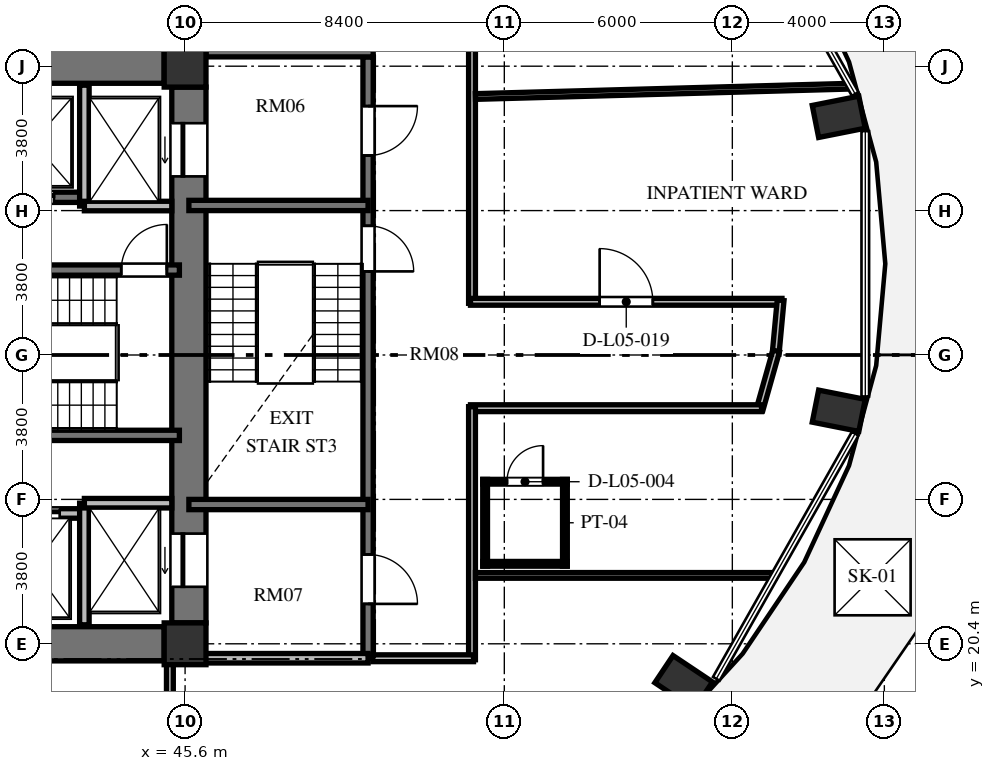
"""IFC4 building model, lengths in metres.
Left out: names, types, materials, properties, quantities, classifications, styles, units other than length and angle.
Written with IfcOpenShell. Run it as: python <this file> out.ifc"""

import sys

from ifc_helpers import new_model, si_unit, direction, frame, frame_2d, origin, origin_2d, place, context, subcontext, project, spatial, rectangle, extrude, element, fill, save


model = new_model("IFC4")
c1 = context("Model", 3, precision=1e-05, world=origin(), true_north=direction((0.0, 1.0)))
c2 = subcontext(c1, "Body", "Model", "MODEL_VIEW")
j1 = project(units=[si_unit("LENGTHUNIT", "METRE"), si_unit("PLANEANGLEUNIT", "RADIAN")], contexts=[c1])
p1 = place(None, origin())
s1 = spatial("IfcSite", under=j1, at=p1, CompositionType="ELEMENT")
p2 = place(p1, origin())
s2 = spatial("IfcBuilding", under=s1, at=p2, CompositionType="ELEMENT")
p3 = place(p2, frame((0.0, 0.0, 25.2)))
s3 = spatial("IfcBuildingStorey", under=s2, at=p3, CompositionType="ELEMENT", Elevation=25.2)
for number, where, z_axis, x_axis in (
    (1, (58.72, 19.386, 0.0), (0.0, 0.0, 1.0), (0.831, -0.556, 0.0)),
    (2, (62.8, 26.532, 0.0), (0.0, 0.0, 1.0), (0.981, -0.195, 0.0)),
    (3, (62.8, 34.268, 0.0), (0.0, 0.0, 1.0), (0.981, 0.195, 0.0)),
):
    element("IfcColumn", number, at=place(p3, frame(where, z_axis=z_axis, x_axis=x_axis)), inside=s3, PredefinedType="COLUMN", context=c2, shape_type="SweptSolid", body=[
        extrude(rectangle(XDim=1.25, YDim=0.86, at=origin_2d()), origin(), (0.0, 0.0, 1.0), 3.648),
    ])
for number, where, z_axis, x_axis in (
    (4, (45.6, 20.4, 0.0), (0.0, 0.0, 1.0), (1.0, 0.0, 0.0)),
    (5, (45.6, 35.6, 0.0), (0.0, 0.0, 1.0), (1.0, 0.0, 0.0)),
):
    element("IfcColumn", number, at=place(p3, frame(where, z_axis=z_axis, x_axis=x_axis)), inside=s3, PredefinedType="COLUMN", context=c2, shape_type="SweptSolid", body=[
        extrude(rectangle(XDim=1.1, YDim=1.1, at=origin_2d()), origin(), (0.0, 0.0, 1.0), 3.648),
    ])
p4 = place(p3, frame((45.7, 20.95, 0.0), z_axis=(0.0, 0.0, 1.0), x_axis=(0.0, 1.0, 0.0)))
e6 = element("IfcWall", 6, at=p4, inside=s3, PredefinedType="SHEAR", context=c2, shape_type="SweptSolid", body=[
    extrude(rectangle(XDim=14.1, YDim=0.9, at=frame_2d((7.05, 0.0))), origin(), (0.0, 0.0, 1.0), 3.648),
])
p5 = place(p4, frame((11.75, 0.0, 0.0)))
e7 = element("IfcOpeningElement", 7, at=p5, cuts=e6, PredefinedType="OPENING", context=c2, shape_type="SweptSolid", body=[
    extrude(rectangle(XDim=1.4, YDim=2.3, at=frame_2d((0.7, 1.15))), frame((0.0, 0.46, 0.0), z_axis=(0.0, -1.0, 0.0), x_axis=(1.0, 0.0, 0.0)), (0.0, 0.0, 1.0), 0.92),
])
p6 = place(p4, frame((0.95, 0.0, 0.0)))
e8 = element("IfcOpeningElement", 8, at=p6, cuts=e6, PredefinedType="OPENING", context=c2, shape_type="SweptSolid", body=[
    extrude(rectangle(XDim=1.4, YDim=2.3, at=frame_2d((0.7, 1.15))), frame((0.0, 0.46, 0.0), z_axis=(0.0, -1.0, 0.0), x_axis=(1.0, 0.0, 0.0)), (0.0, 0.0, 1.0), 0.92),
])
for number, where, z_axis, x_axis in (
    (9, (39.75, 20.4, 0.0), (0.0, 0.0, 1.0), (1.0, 0.0, 0.0)),
    (10, (39.75, 35.6, 0.0), (0.0, 0.0, 1.0), (1.0, 0.0, 0.0)),
):
    element("IfcWall", number, at=place(p3, frame(where, z_axis=z_axis, x_axis=x_axis)), inside=s3, PredefinedType="SHEAR", context=c2, shape_type="SweptSolid", body=[
        extrude(rectangle(XDim=5.3, YDim=0.9, at=frame_2d((2.65, 0.0))), origin(), (0.0, 0.0, 1.0), 3.648),
    ])
p7 = place(p3, frame((37.465, 30.235, 0.0), z_axis=(0.0, 0.0, 1.0), x_axis=(1.0, 0.0, 0.0)))
e11 = element("IfcWall", 11, at=p7, inside=s3, PredefinedType="SHEAR", context=c2, shape_type="SweptSolid", body=[
    extrude(rectangle(XDim=7.985, YDim=0.27, at=frame_2d((3.992, 0.0))), origin(), (0.0, 0.0, 1.0), 3.648),
])
p8 = place(p7, frame((6.455, 0.0, 0.0)))
e12 = element("IfcOpeningElement", 12, at=p8, cuts=e11, PredefinedType="OPENING", context=c2, shape_type="SweptSolid", body=[
    extrude(rectangle(XDim=1.2, YDim=2.15, at=frame_2d((0.6, 1.075))), frame((0.0, 0.145, 0.0), z_axis=(0.0, -1.0, 0.0), x_axis=(1.0, 0.0, 0.0)), (0.0, 0.0, 1.0), 0.29),
])
p9 = place(p3, frame((37.465, 25.885, 0.0), z_axis=(0.0, 0.0, 1.0), x_axis=(1.0, 0.0, 0.0)))
e13 = element("IfcWall", 13, at=p9, inside=s3, PredefinedType="SHEAR", context=c2, shape_type="SweptSolid", body=[
    extrude(rectangle(XDim=7.985, YDim=0.27, at=frame_2d((3.992, 0.0))), origin(), (0.0, 0.0, 1.0), 3.648),
])
p10 = place(p3, frame((26.55, 32.15, 0.0), z_axis=(0.0, 0.0, 1.0), x_axis=(1.0, 0.0, 0.0)))
e14 = element("IfcWall", 14, at=p10, inside=s3, PredefinedType="SHEAR", context=c2, shape_type="SweptSolid", body=[
    extrude(rectangle(XDim=16.4, YDim=0.27, at=frame_2d((8.2, 0.0))), origin(), (0.0, 0.0, 1.0), 3.648),
])
p11 = place(p10, frame((1.1, 0.0, 0.0)))
e15 = element("IfcOpeningElement", 15, at=p11, cuts=e14, PredefinedType="OPENING", context=c2, shape_type="SweptSolid", body=[
    extrude(rectangle(XDim=1.1, YDim=2.2, at=frame_2d((0.55, 1.1))), frame((0.0, 0.145, 0.0), z_axis=(0.0, -1.0, 0.0), x_axis=(1.0, 0.0, 0.0)), (0.0, 0.0, 1.0), 0.29),
])
p12 = place(p10, frame((3.7, 0.0, 0.0)))
e16 = element("IfcOpeningElement", 16, at=p12, cuts=e14, PredefinedType="OPENING", context=c2, shape_type="SweptSolid", body=[
    extrude(rectangle(XDim=1.1, YDim=2.2, at=frame_2d((0.55, 1.1))), frame((0.0, 0.145, 0.0), z_axis=(0.0, -1.0, 0.0), x_axis=(1.0, 0.0, 0.0)), (0.0, 0.0, 1.0), 0.29),
])
p13 = place(p10, frame((6.5, 0.0, 0.0)))
e17 = element("IfcOpeningElement", 17, at=p13, cuts=e14, PredefinedType="OPENING", context=c2, shape_type="SweptSolid", body=[
    extrude(rectangle(XDim=1.1, YDim=2.2, at=frame_2d((0.55, 1.1))), frame((0.0, 0.145, 0.0), z_axis=(0.0, -1.0, 0.0), x_axis=(1.0, 0.0, 0.0)), (0.0, 0.0, 1.0), 0.29),
])
p14 = place(p10, frame((9.1, 0.0, 0.0)))
e18 = element("IfcOpeningElement", 18, at=p14, cuts=e14, PredefinedType="OPENING", context=c2, shape_type="SweptSolid", body=[
    extrude(rectangle(XDim=1.1, YDim=2.2, at=frame_2d((0.55, 1.1))), frame((0.0, 0.145, 0.0), z_axis=(0.0, -1.0, 0.0), x_axis=(1.0, 0.0, 0.0)), (0.0, 0.0, 1.0), 0.29),
])
p15 = place(p10, frame((11.9, 0.0, 0.0)))
e19 = element("IfcOpeningElement", 19, at=p15, cuts=e14, PredefinedType="OPENING", context=c2, shape_type="SweptSolid", body=[
    extrude(rectangle(XDim=1.1, YDim=2.2, at=frame_2d((0.55, 1.1))), frame((0.0, 0.145, 0.0), z_axis=(0.0, -1.0, 0.0), x_axis=(1.0, 0.0, 0.0)), (0.0, 0.0, 1.0), 0.29),
])
p16 = place(p10, frame((14.5, 0.0, 0.0)))
e20 = element("IfcOpeningElement", 20, at=p16, cuts=e14, PredefinedType="OPENING", context=c2, shape_type="SweptSolid", body=[
    extrude(rectangle(XDim=1.1, YDim=2.2, at=frame_2d((0.55, 1.1))), frame((0.0, 0.145, 0.0), z_axis=(0.0, -1.0, 0.0), x_axis=(1.0, 0.0, 0.0)), (0.0, 0.0, 1.0), 0.29),
])
p17 = place(p3, frame((26.75, 23.83, 0.0), z_axis=(0.0, 0.0, 1.0), x_axis=(1.0, 0.0, 0.0)))
e21 = element("IfcWall", 21, at=p17, inside=s3, PredefinedType="SOLIDWALL", context=c2, shape_type="SweptSolid", body=[
    extrude(rectangle(XDim=16.2, YDim=0.25, at=frame_2d((8.1, 0.0))), origin(), (0.0, 0.0, 1.0), 3.428),
])
p18 = place(p17, frame((0.9, 0.0, 0.0)))
e22 = element("IfcOpeningElement", 22, at=p18, cuts=e21, PredefinedType="OPENING", context=c2, shape_type="SweptSolid", body=[
    extrude(rectangle(XDim=1.1, YDim=2.2, at=frame_2d((0.55, 1.1))), frame((0.0, 0.135, 0.0), z_axis=(0.0, -1.0, 0.0), x_axis=(1.0, 0.0, 0.0)), (0.0, 0.0, 1.0), 0.27),
])
p19 = place(p17, frame((3.5, 0.0, 0.0)))
e23 = element("IfcOpeningElement", 23, at=p19, cuts=e21, PredefinedType="OPENING", context=c2, shape_type="SweptSolid", body=[
    extrude(rectangle(XDim=1.1, YDim=2.2, at=frame_2d((0.55, 1.1))), frame((0.0, 0.135, 0.0), z_axis=(0.0, -1.0, 0.0), x_axis=(1.0, 0.0, 0.0)), (0.0, 0.0, 1.0), 0.27),
])
p20 = place(p17, frame((6.3, 0.0, 0.0)))
e24 = element("IfcOpeningElement", 24, at=p20, cuts=e21, PredefinedType="OPENING", context=c2, shape_type="SweptSolid", body=[
    extrude(rectangle(XDim=1.1, YDim=2.2, at=frame_2d((0.55, 1.1))), frame((0.0, 0.135, 0.0), z_axis=(0.0, -1.0, 0.0), x_axis=(1.0, 0.0, 0.0)), (0.0, 0.0, 1.0), 0.27),
])
p21 = place(p17, frame((8.9, 0.0, 0.0)))
e25 = element("IfcOpeningElement", 25, at=p21, cuts=e21, PredefinedType="OPENING", context=c2, shape_type="SweptSolid", body=[
    extrude(rectangle(XDim=1.1, YDim=2.2, at=frame_2d((0.55, 1.1))), frame((0.0, 0.135, 0.0), z_axis=(0.0, -1.0, 0.0), x_axis=(1.0, 0.0, 0.0)), (0.0, 0.0, 1.0), 0.27),
])
p22 = place(p17, frame((11.7, 0.0, 0.0)))
e26 = element("IfcOpeningElement", 26, at=p22, cuts=e21, PredefinedType="OPENING", context=c2, shape_type="SweptSolid", body=[
    extrude(rectangle(XDim=1.1, YDim=2.2, at=frame_2d((0.55, 1.1))), frame((0.0, 0.135, 0.0), z_axis=(0.0, -1.0, 0.0), x_axis=(1.0, 0.0, 0.0)), (0.0, 0.0, 1.0), 0.27),
])
p23 = place(p17, frame((14.15, 0.0, 0.0)))
e27 = element("IfcOpeningElement", 27, at=p23, cuts=e21, PredefinedType="OPENING", context=c2, shape_type="SweptSolid", body=[
    extrude(rectangle(XDim=1.4, YDim=2.3, at=frame_2d((0.7, 1.15))), frame((0.0, 0.135, 0.0), z_axis=(0.0, -1.0, 0.0), x_axis=(1.0, 0.0, 0.0)), (0.0, 0.0, 1.0), 0.27),
])
p24 = place(p3, frame((42.95, 31.92, 0.0), z_axis=(0.0, 0.0, 1.0), x_axis=(0.0, 1.0, 0.0)))
e28 = element("IfcWall", 28, at=p24, inside=s3, PredefinedType="SOLIDWALL", context=c2, shape_type="SweptSolid", body=[
    extrude(rectangle(XDim=3.18, YDim=0.25, at=frame_2d((1.59, 0.0))), origin(), (0.0, 0.0, 1.0), 3.428),
])
p25 = place(p3, frame((42.95, 31.92, 0.0), z_axis=(0.0, 0.0, 1.0), x_axis=(1.0, 0.0, 0.0)))
e29 = element("IfcWall", 29, at=p25, inside=s3, PredefinedType="SOLIDWALL", context=c2, shape_type="SweptSolid", body=[
    extrude(rectangle(XDim=2.3, YDim=0.25, at=frame_2d((1.15, 0.0))), origin(), (0.0, 0.0, 1.0), 3.428),
])
p26 = place(p3, frame((42.95, 20.9, 0.0), z_axis=(0.0, 0.0, 1.0), x_axis=(0.0, 1.0, 0.0)))
e30 = element("IfcWall", 30, at=p26, inside=s3, PredefinedType="SOLIDWALL", context=c2, shape_type="SweptSolid", body=[
    extrude(rectangle(XDim=3.2, YDim=0.25, at=frame_2d((1.6, 0.0))), origin(), (0.0, 0.0, 1.0), 3.428),
])
p27 = place(p3, frame((42.95, 24.1, 0.0), z_axis=(0.0, 0.0, 1.0), x_axis=(1.0, 0.0, 0.0)))
e31 = element("IfcWall", 31, at=p27, inside=s3, PredefinedType="SOLIDWALL", context=c2, shape_type="SweptSolid", body=[
    extrude(rectangle(XDim=2.3, YDim=0.25, at=frame_2d((1.15, 0.0))), origin(), (0.0, 0.0, 1.0), 3.428),
])
p28 = place(p3, frame((50.415, 35.845, 0.0), z_axis=(0.0, 0.0, 1.0), x_axis=(0.0, -1.0, 0.0)))
e32 = element("IfcWall", 32, at=p28, inside=s3, PredefinedType="SHEAR", context=c2, shape_type="SweptSolid", body=[
    extrude(rectangle(XDim=15.825, YDim=0.27, at=frame_2d((7.913, 0.0))), origin(), (0.0, 0.0, 1.0), 3.648),
])
p29 = place(p28, frame((4.445, 0.0, 0.0)))
e33 = element("IfcOpeningElement", 33, at=p29, cuts=e32, PredefinedType="OPENING", context=c2, shape_type="SweptSolid", body=[
    extrude(rectangle(XDim=1.2, YDim=2.15, at=frame_2d((0.6, 1.075))), frame((0.0, 0.145, 0.0), z_axis=(0.0, -1.0, 0.0), x_axis=(1.0, 0.0, 0.0)), (0.0, 0.0, 1.0), 0.29),
])
p30 = place(p28, frame((1.295, 0.0, 0.0)))
e34 = element("IfcOpeningElement", 34, at=p30, cuts=e32, PredefinedType="OPENING", context=c2, shape_type="SweptSolid", body=[
    extrude(rectangle(XDim=1.3, YDim=2.2, at=frame_2d((0.65, 1.1))), frame((0.0, 0.145, 0.0), z_axis=(0.0, -1.0, 0.0), x_axis=(1.0, 0.0, 0.0)), (0.0, 0.0, 1.0), 0.29),
])
p31 = place(p28, frame((13.095, 0.0, 0.0)))
e35 = element("IfcOpeningElement", 35, at=p31, cuts=e32, PredefinedType="OPENING", context=c2, shape_type="SweptSolid", body=[
    extrude(rectangle(XDim=1.3, YDim=2.2, at=frame_2d((0.65, 1.1))), frame((0.0, 0.145, 0.0), z_axis=(0.0, -1.0, 0.0), x_axis=(1.0, 0.0, 0.0)), (0.0, 0.0, 1.0), 0.29),
])
p32 = place(p3, frame((46.15, 35.98, 0.0), z_axis=(0.0, 0.0, 1.0), x_axis=(1.0, 0.0, 0.0)))
e36 = element("IfcWall", 36, at=p32, inside=s3, PredefinedType="SHEAR", context=c2, shape_type="SweptSolid", body=[
    extrude(rectangle(XDim=4.4, YDim=0.27, at=frame_2d((2.2, 0.0))), origin(), (0.0, 0.0, 1.0), 3.648),
])
for number, where, z_axis, x_axis in (
    (37, (45.7, 31.935, 0.0), (0.0, 0.0, 1.0), (1.0, 0.0, 0.0)),
    (38, (45.7, 24.065, 0.0), (0.0, 0.0, 1.0), (1.0, 0.0, 0.0)),
):
    element("IfcWall", number, at=place(p3, frame(where, z_axis=z_axis, x_axis=x_axis)), inside=s3, PredefinedType="SHEAR", context=c2, shape_type="SweptSolid", body=[
        extrude(rectangle(XDim=4.715, YDim=0.27, at=frame_2d((2.357, 0.0))), origin(), (0.0, 0.0, 1.0), 3.648),
    ])
p33 = place(p3, frame((45.7, 20.02, 0.0), z_axis=(0.0, 0.0, 1.0), x_axis=(1.0, 0.0, 0.0)))
e39 = element("IfcWall", 39, at=p33, inside=s3, PredefinedType="SOLIDWALL", context=c2, shape_type="SweptSolid", body=[
    extrude(rectangle(XDim=4.715, YDim=0.25, at=frame_2d((2.357, 0.0))), origin(), (0.0, 0.0, 1.0), 2.813),
])
p34 = place(p3, frame((53.15, 38.79, 0.0), z_axis=(0.0, 0.0, 1.0), x_axis=(0.0, -1.0, 0.0)))
e40 = element("IfcWall", 40, at=p34, inside=s3, PredefinedType="PARTITIONING", context=c2, shape_type="SweptSolid", body=[
    extrude(rectangle(XDim=9.43, YDim=0.18, at=frame_2d((4.715, 0.0))), origin(), (0.0, 0.0, 1.0), 3.428),
])
p35 = place(p3, frame((53.11, 29.4, 0.0), z_axis=(0.0, 0.0, 1.0), x_axis=(1.0, 0.0, 0.0)))
e41 = element("IfcWall", 41, at=p35, inside=s3, PredefinedType="PARTITIONING", context=c2, shape_type="SweptSolid", body=[
    extrude(rectangle(XDim=8.197, YDim=0.18, at=frame_2d((4.098, 0.0))), origin(), (0.0, 0.0, 1.0), 3.428),
])
p36 = place(p35, frame((3.398, 0.0, 0.0)))
e42 = element("IfcOpeningElement", 42, at=p36, cuts=e41, PredefinedType="OPENING", context=c2, shape_type="SweptSolid", body=[
    extrude(rectangle(XDim=1.4, YDim=2.2, at=frame_2d((0.7, 1.1))), frame((0.0, 0.1, 0.0), z_axis=(0.0, -1.0, 0.0), x_axis=(1.0, 0.0, 0.0)), (0.0, 0.0, 1.0), 0.2),
])
p37 = place(p3, frame((61.271, 29.44, 0.0), z_axis=(0.0, 0.0, 1.0), x_axis=(-0.092539930621, -0.995708974169, 0.0)))
e43 = element("IfcWall", 43, at=p37, inside=s3, PredefinedType="PARTITIONING", context=c2, shape_type="SweptSolid", body=[
    extrude(rectangle(XDim=1.417, YDim=0.18, at=frame_2d((0.708, 0.0))), origin(), (0.0, 0.0, 1.0), 3.428),
])
p38 = place(p3, frame((61.154, 28.107, 0.0), z_axis=(0.0, 0.0, 1.0), x_axis=(-0.271748942561, -0.962368179138, 0.0)))
e44 = element("IfcWall", 44, at=p38, inside=s3, PredefinedType="PARTITIONING", context=c2, shape_type="SweptSolid", body=[
    extrude(rectangle(XDim=1.606, YDim=0.18, at=frame_2d((0.803, 0.0))), origin(), (0.0, 0.0, 1.0), 3.428),
])
p39 = place(p3, frame((60.768, 26.6, 0.0), z_axis=(0.0, 0.0, 1.0), x_axis=(-1.0, 0.0, 0.0)))
e45 = element("IfcWall", 45, at=p39, inside=s3, PredefinedType="PARTITIONING", context=c2, shape_type="SweptSolid", body=[
    extrude(rectangle(XDim=7.658, YDim=0.18, at=frame_2d((3.829, 0.0))), origin(), (0.0, 0.0, 1.0), 3.428),
])
p40 = place(p3, frame((53.15, 26.64, 0.0), z_axis=(0.0, 0.0, 1.0), x_axis=(0.0, -1.0, 0.0)))
e46 = element("IfcWall", 46, at=p40, inside=s3, PredefinedType="PARTITIONING", context=c2, shape_type="SweptSolid", body=[
    extrude(rectangle(XDim=6.66, YDim=0.18, at=frame_2d((3.33, 0.0))), origin(), (0.0, 0.0, 1.0), 3.428),
])
p41 = place(p3, frame((53.19, 20.02, 0.0), z_axis=(0.0, 0.0, 1.0), x_axis=(-1.0, 0.0, 0.0)))
e47 = element("IfcWall", 47, at=p41, inside=s3, PredefinedType="PARTITIONING", context=c2, shape_type="SweptSolid", body=[
    extrude(rectangle(XDim=2.65, YDim=0.18, at=frame_2d((1.325, 0.0))), origin(), (0.0, 0.0, 1.0), 2.813),
])
p42 = place(p3, frame((45.2, 19.91, 0.0), z_axis=(0.0, 0.0, 1.0), x_axis=(0.0, -1.0, 0.0)))
e48 = element("IfcWall", 48, at=p42, inside=s3, PredefinedType="PARTITIONING", context=c2, shape_type="SweptSolid", body=[
    extrude(rectangle(XDim=2.55, YDim=0.18, at=frame_2d((1.275, 0.0))), origin(), (0.0, 0.0, 1.0), 3.428),
])
p43 = place(p3, frame((53.24, 22.2, 0.0), z_axis=(0.0, 0.0, 1.0), x_axis=(1.0, 0.0, 0.0)))
e49 = element("IfcWall", 49, at=p43, inside=s3, PredefinedType="PARTITIONING", context=c2, shape_type="SweptSolid", body=[
    extrude(rectangle(XDim=7.875, YDim=0.15, at=frame_2d((3.938, 0.0))), origin(), (0.0, 0.0, 1.0), 3.428),
])
p44 = place(p3, frame((53.24, 34.802, 0.0), z_axis=(0.0, 0.0, 1.0), x_axis=(0.999620561748, 0.027545099924, 0.0)))
e50 = element("IfcWall", 50, at=p44, inside=s3, PredefinedType="PARTITIONING", context=c2, shape_type="SweptSolid", body=[
    extrude(rectangle(XDim=9.891, YDim=0.15, at=frame_2d((4.946, 0.0))), origin(), (0.0, 0.0, 1.0), 2.813),
])
p45 = place(p3, frame((53.435, 24.665, 0.0), z_axis=(0.0, 0.0, 1.0), x_axis=(1.0, 0.0, 0.0)))
e51 = element("IfcWall", 51, at=p45, inside=s3, PredefinedType="PARTITIONING", context=c2, shape_type="SweptSolid", body=[
    extrude(rectangle(XDim=2.22, YDim=0.125, at=frame_2d((1.11, 0.0))), origin(), (0.0, 0.0, 1.0), 3.428),
])
p46 = place(p45, frame((0.635, 0.0, 0.0)))
e52 = element("IfcOpeningElement", 52, at=p46, cuts=e51, PredefinedType="OPENING", context=c2, shape_type="SweptSolid", body=[
    extrude(rectangle(XDim=0.95, YDim=2.1, at=frame_2d((0.475, 1.05))), frame((0.0, 0.073, 0.0), z_axis=(0.0, -1.0, 0.0), x_axis=(1.0, 0.0, 0.0)), (0.0, 0.0, 1.0), 0.145),
])
p47 = place(p3, frame((53.435, 22.505, 0.0), z_axis=(0.0, 0.0, 1.0), x_axis=(1.0, 0.0, 0.0)))
e53 = element("IfcWall", 53, at=p47, inside=s3, PredefinedType="PARTITIONING", context=c2, shape_type="SweptSolid", body=[
    extrude(rectangle(XDim=2.22, YDim=0.125, at=frame_2d((1.11, 0.0))), origin(), (0.0, 0.0, 1.0), 3.428),
])
for number, where, z_axis, x_axis in (
    (54, (55.595, 22.445, 0.0), (0.0, 0.0, 1.0), (0.0, 1.0, 0.0)),
    (55, (53.495, 22.445, 0.0), (0.0, 0.0, 1.0), (0.0, 1.0, 0.0)),
):
    element("IfcWall", number, at=place(p3, frame(where, z_axis=z_axis, x_axis=x_axis)), inside=s3, PredefinedType="PARTITIONING", context=c2, shape_type="SweptSolid", body=[
        extrude(rectangle(XDim=2.28, YDim=0.125, at=frame_2d((1.14, 0.0))), origin(), (0.0, 0.0, 1.0), 3.428),
    ])
p48 = place(p3, frame((0.0, 0.0, -0.22)))
p49 = place(p48, frame((63.691, 22.15, 0.0)))
p50 = place(p49, frame((0.0, 0.0, 0.22)))
e56 = element("IfcWindow", 56, at=p50, inside=s3, PartitioningType="SINGLE_PANEL", PredefinedType="SKYLIGHT", context=c2, shape_type="SweptSolid", body=[
    extrude(rectangle(XDim=2.0, YDim=2.0, at=origin_2d()), origin(), (0.0, 0.0, 1.0), 0.05),
])
p51 = place(p8, origin())
e57 = element("IfcDoor", 57, at=p51, inside=s3, OperationType="SINGLE_SWING_RIGHT", PredefinedType="DOOR", context=c2, shape_type="SweptSolid", body=[
    extrude(rectangle(XDim=1.2, YDim=2.15, at=frame_2d((0.6, 1.075))), frame((0.0, 0.025, 0.0), z_axis=(0.0, -1.0, 0.0), x_axis=(1.0, 0.0, 0.0)), (0.0, 0.0, 1.0), 0.05),
])
fill(e12, e57)
p52 = place(p16, origin())
e58 = element("IfcDoor", 58, at=p52, inside=s3, OperationType="SLIDING_TO_LEFT", PredefinedType="DOOR", context=c2, shape_type="SweptSolid", body=[
    extrude(rectangle(XDim=1.1, YDim=2.2, at=frame_2d((0.55, 1.1))), frame((0.0, 0.025, 0.0), z_axis=(0.0, -1.0, 0.0), x_axis=(1.0, 0.0, 0.0)), (0.0, 0.0, 1.0), 0.05),
])
fill(e20, e58)
p53 = place(p5, origin())
e59 = element("IfcDoor", 59, at=p53, inside=s3, OperationType="SLIDING_TO_LEFT", PredefinedType="DOOR", context=c2, shape_type="SweptSolid", body=[
    extrude(rectangle(XDim=1.4, YDim=2.3, at=frame_2d((0.7, 1.15))), frame((0.0, 0.025, 0.0), z_axis=(0.0, -1.0, 0.0), x_axis=(1.0, 0.0, 0.0)), (0.0, 0.0, 1.0), 0.05),
])
fill(e7, e59)
p54 = place(p6, origin())
e60 = element("IfcDoor", 60, at=p54, inside=s3, OperationType="SLIDING_TO_LEFT", PredefinedType="DOOR", context=c2, shape_type="SweptSolid", body=[
    extrude(rectangle(XDim=1.4, YDim=2.3, at=frame_2d((0.7, 1.15))), frame((0.0, 0.025, 0.0), z_axis=(0.0, -1.0, 0.0), x_axis=(1.0, 0.0, 0.0)), (0.0, 0.0, 1.0), 0.05),
])
fill(e8, e60)
p55 = place(p23, origin())
e61 = element("IfcDoor", 61, at=p55, inside=s3, OperationType="SLIDING_TO_LEFT", PredefinedType="DOOR", context=c2, shape_type="SweptSolid", body=[
    extrude(rectangle(XDim=1.4, YDim=2.3, at=frame_2d((0.7, 1.15))), frame((0.0, 0.025, 0.0), z_axis=(0.0, -1.0, 0.0), x_axis=(1.0, 0.0, 0.0)), (0.0, 0.0, 1.0), 0.05),
])
fill(e27, e61)
p56 = place(p29, origin())
e62 = element("IfcDoor", 62, at=p56, inside=s3, OperationType="SINGLE_SWING_RIGHT", PredefinedType="DOOR", context=c2, shape_type="SweptSolid", body=[
    extrude(rectangle(XDim=1.2, YDim=2.15, at=frame_2d((0.6, 1.075))), frame((0.0, 0.025, 0.0), z_axis=(0.0, -1.0, 0.0), x_axis=(1.0, 0.0, 0.0)), (0.0, 0.0, 1.0), 0.05),
])
fill(e33, e62)
p57 = place(p30, origin())
e63 = element("IfcDoor", 63, at=p57, inside=s3, OperationType="SINGLE_SWING_LEFT", PredefinedType="DOOR", context=c2, shape_type="SweptSolid", body=[
    extrude(rectangle(XDim=1.3, YDim=2.2, at=frame_2d((0.65, 1.1))), frame((0.0, 0.025, 0.0), z_axis=(0.0, -1.0, 0.0), x_axis=(1.0, 0.0, 0.0)), (0.0, 0.0, 1.0), 0.05),
])
fill(e34, e63)
p58 = place(p31, origin())
e64 = element("IfcDoor", 64, at=p58, inside=s3, OperationType="SINGLE_SWING_RIGHT", PredefinedType="DOOR", context=c2, shape_type="SweptSolid", body=[
    extrude(rectangle(XDim=1.3, YDim=2.2, at=frame_2d((0.65, 1.1))), frame((0.0, 0.025, 0.0), z_axis=(0.0, -1.0, 0.0), x_axis=(1.0, 0.0, 0.0)), (0.0, 0.0, 1.0), 0.05),
])
fill(e35, e64)
p59 = place(p46, origin())
e65 = element("IfcDoor", 65, at=p59, inside=s3, OperationType="SINGLE_SWING_RIGHT", PredefinedType="DOOR", context=c2, shape_type="SweptSolid", body=[
    extrude(rectangle(XDim=0.95, YDim=2.1, at=frame_2d((0.475, 1.05))), frame((0.0, 0.025, 0.0), z_axis=(0.0, -1.0, 0.0), x_axis=(1.0, 0.0, 0.0)), (0.0, 0.0, 1.0), 0.05),
])
fill(e52, e65)
p60 = place(p36, origin())
e66 = element("IfcDoor", 66, at=p60, inside=s3, OperationType="SINGLE_SWING_LEFT", PredefinedType="DOOR", context=c2, shape_type="SweptSolid", body=[
    extrude(rectangle(XDim=1.4, YDim=2.2, at=frame_2d((0.7, 1.1))), frame((0.0, 0.025, 0.0), z_axis=(0.0, -1.0, 0.0), x_axis=(1.0, 0.0, 0.0)), (0.0, 0.0, 1.0), 0.05),
])
fill(e42, e66)
save(model, sys.argv[1])
